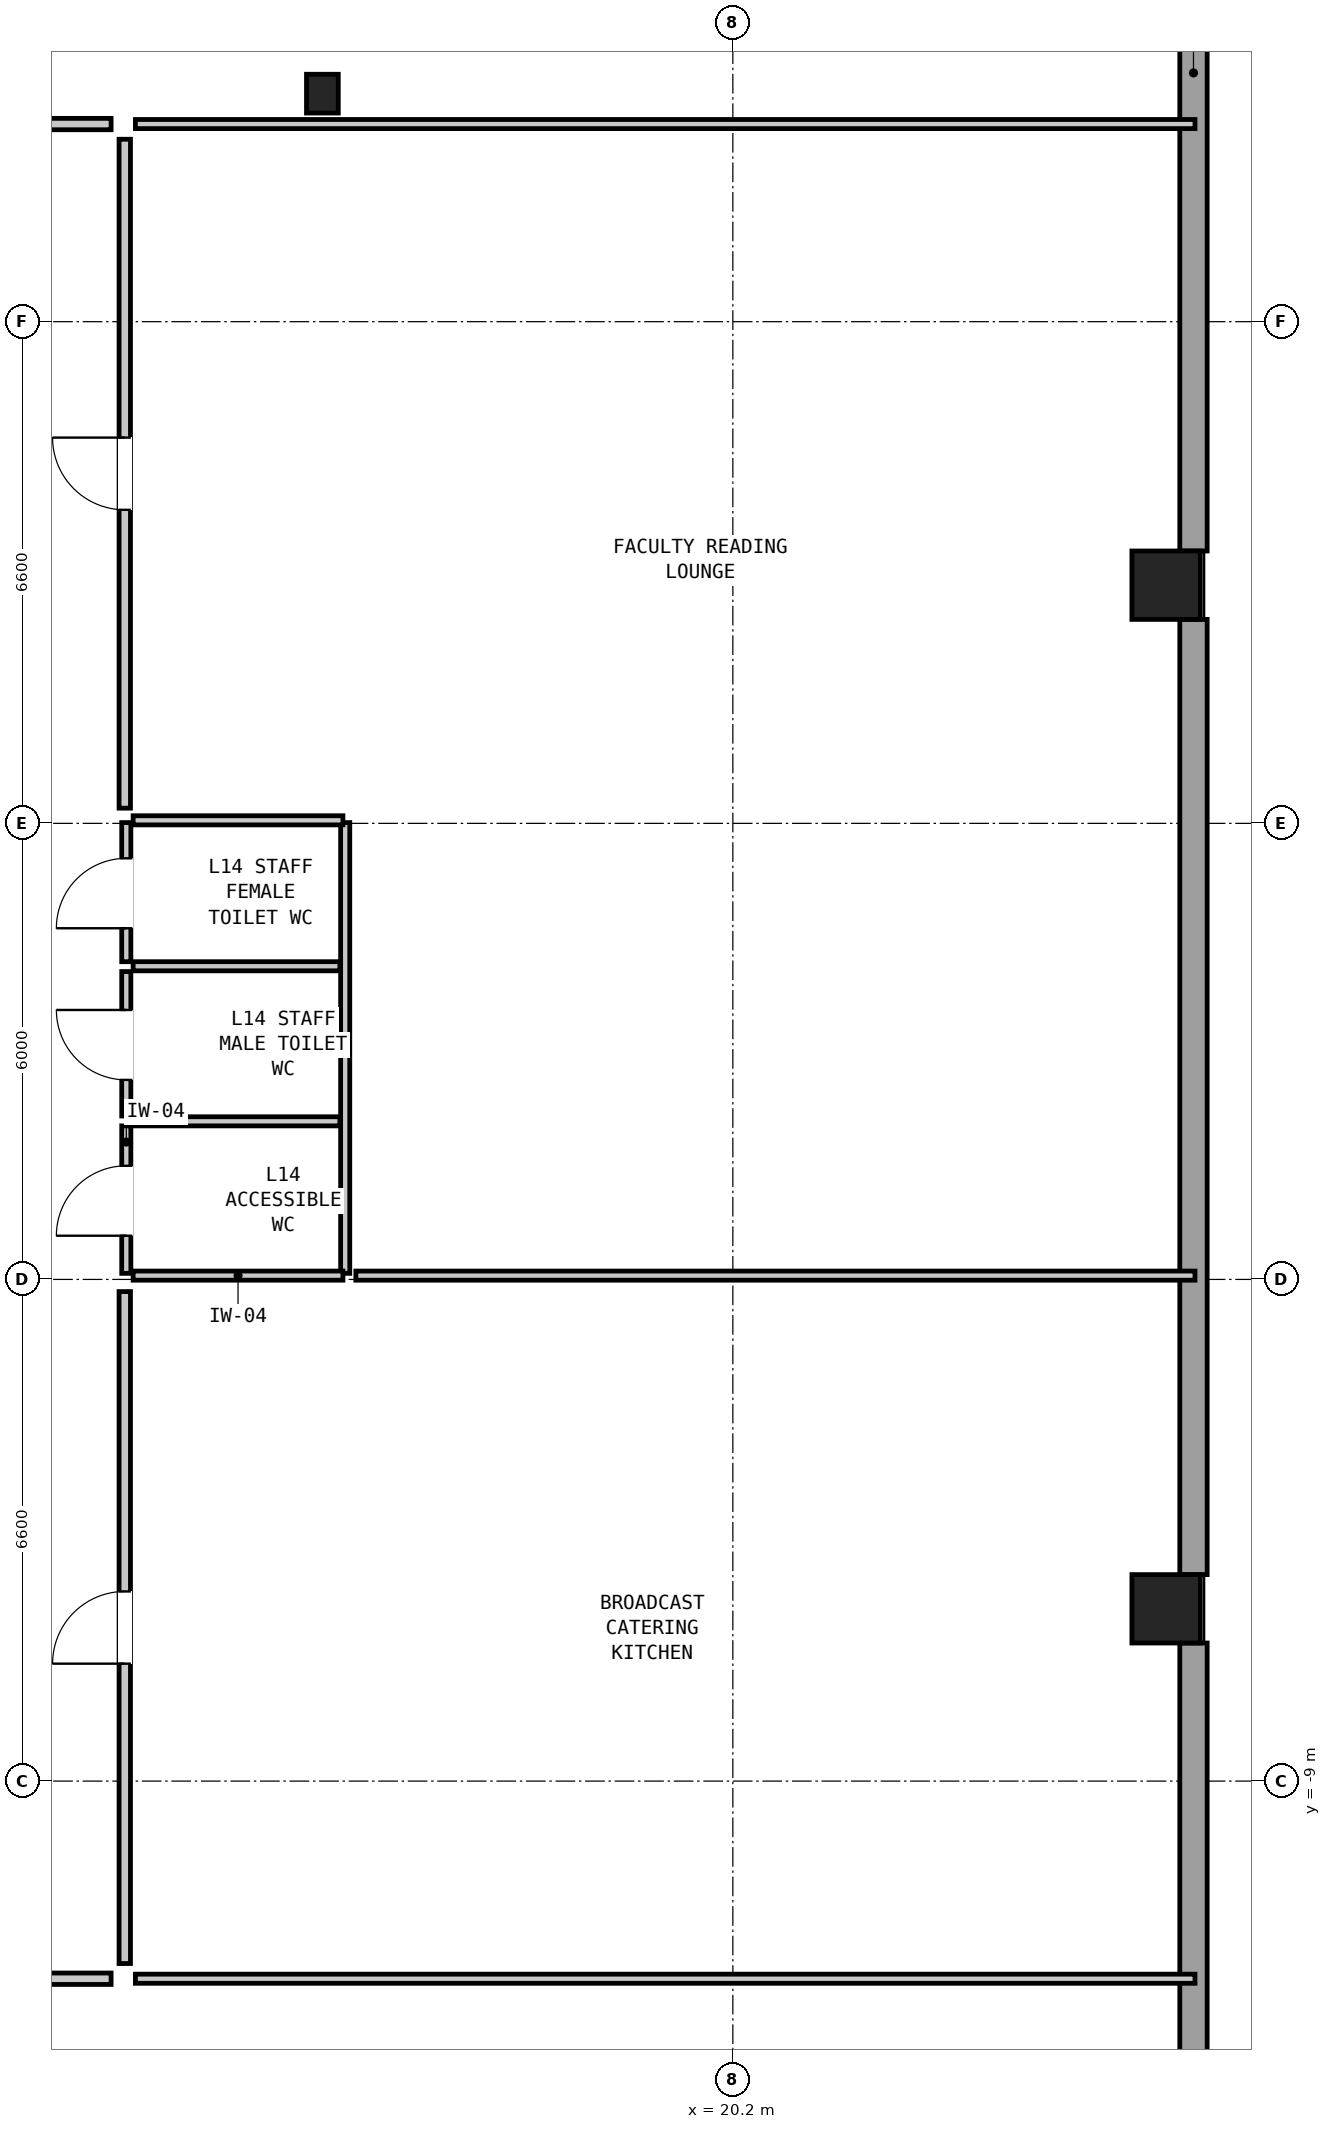
"""IFC4 building model, lengths in metres.
Left out: names, types, materials, properties, quantities, classifications, styles, units other than length and angle.
Written with IfcOpenShell. Run it as: python <this file> out.ifc"""

import sys

from ifc_helpers import new_model, si_unit, direction, frame, frame_2d, origin, origin_2d, place, context, subcontext, project, spatial, rectangle, hollow_rectangle, i_section, extrude, element, fill, save


model = new_model("IFC4")
c1 = context("Model", 3, precision=1e-05, world=origin(), true_north=direction((0.0, 1.0)))
c2 = subcontext(c1, "Body", "Model", "MODEL_VIEW")
j1 = project(units=[si_unit("LENGTHUNIT", "METRE"), si_unit("PLANEANGLEUNIT", "RADIAN")], contexts=[c1])
p1 = place(None, origin())
s1 = spatial("IfcSite", under=j1, at=p1, CompositionType="ELEMENT")
p2 = place(p1, origin())
s2 = spatial("IfcBuilding", under=s1, at=p2, CompositionType="ELEMENT")
p3 = place(p2, frame((0.0, 0.0, 50.5)))
s3 = spatial("IfcBuildingStorey", under=s2, at=p3, CompositionType="ELEMENT", Elevation=50.5)
for number, where, z_axis, x_axis in (
    (1, (25.9, -6.733, 0.0), (0.0, 0.0, 1.0), (0.0, 1.0, 0.0)),
    (2, (25.9, 6.733, 0.0), (0.0, 0.0, 1.0), (0.0, 1.0, 0.0)),
):
    element("IfcColumn", number, at=place(p3, frame(where, z_axis=z_axis, x_axis=x_axis)), inside=s3, PredefinedType="COLUMN", context=c2, shape_type="SweptSolid", body=[
        extrude(hollow_rectangle(XDim=0.9, YDim=0.9, WallThickness=0.055, at=origin_2d()), origin(), (0.0, 0.0, 1.0), 3.05),
    ])
p4 = place(p3, frame((14.8, 13.2, 0.0), z_axis=(0.0, 0.0, 1.0), x_axis=(1.0, 0.0, 0.0)))
e3 = element("IfcColumn", 3, at=p4, inside=s3, PredefinedType="COLUMN", context=c2, shape_type="SweptSolid", body=[
    extrude(i_section(OverallWidth=0.418, OverallDepth=0.51, WebThickness=0.042, FlangeThickness=0.068, at=origin_2d()), origin(), (0.0, 0.0, 1.0), 3.05),
])
p5 = place(p3, frame((26.26, 19.762, 0.0), z_axis=(0.0, 0.0, 1.0), x_axis=(0.0, -1.0, 0.0)))
e4 = element("IfcWall", 4, at=p5, inside=s3, PredefinedType="SOLIDWALL", context=c2, shape_type="SweptSolid", body=[
    extrude(rectangle(XDim=12.579, YDim=0.36, at=frame_2d((6.289, 0.0))), origin(), (0.0, 0.0, 1.0), 0.95),
])
p6 = place(p3, frame((26.26, 6.283, 0.0), z_axis=(0.0, 0.0, 1.0), x_axis=(0.0, -1.0, 0.0)))
e5 = element("IfcWall", 5, at=p6, inside=s3, PredefinedType="SOLIDWALL", context=c2, shape_type="SweptSolid", body=[
    extrude(rectangle(XDim=12.566, YDim=0.36, at=frame_2d((6.283, 0.0))), origin(), (0.0, 0.0, 1.0), 0.95),
])
p7 = place(p3, frame((26.26, -7.183, 0.0), z_axis=(0.0, 0.0, 1.0), x_axis=(0.0, -1.0, 0.0)))
e6 = element("IfcWall", 6, at=p7, inside=s3, PredefinedType="SOLIDWALL", context=c2, shape_type="SweptSolid", body=[
    extrude(rectangle(XDim=12.579, YDim=0.36, at=frame_2d((6.289, 0.0))), origin(), (0.0, 0.0, 1.0), 0.95),
])
p8 = place(p3, frame((12.22, -2.32, 0.0), z_axis=(0.0, 0.0, 1.0), x_axis=(0.0, 1.0, 0.0)))
e7 = element("IfcWall", 7, at=p8, inside=s3, PredefinedType="PARTITIONING", context=c2, shape_type="SweptSolid", body=[
    extrude(rectangle(XDim=1.94, YDim=0.12, at=frame_2d((0.97, 0.0))), origin(), (0.0, 0.0, 1.0), 2.83),
])
p9 = place(p8, frame((0.495, 0.0, 0.0)))
e8 = element("IfcOpeningElement", 8, at=p9, cuts=e7, PredefinedType="OPENING", context=c2, shape_type="SweptSolid", body=[
    extrude(rectangle(XDim=0.92, YDim=2.1, at=frame_2d((0.46, 1.05))), frame((0.0, 0.072, 0.0), z_axis=(0.0, -1.0, 0.0), x_axis=(1.0, 0.0, 0.0)), (0.0, 0.0, 1.0), 0.144),
])
p10 = place(p3, frame((12.22, -0.25, 0.0), z_axis=(0.0, 0.0, 1.0), x_axis=(0.0, 1.0, 0.0)))
e9 = element("IfcWall", 9, at=p10, inside=s3, PredefinedType="PARTITIONING", context=c2, shape_type="SweptSolid", body=[
    extrude(rectangle(XDim=1.9, YDim=0.12, at=frame_2d((0.95, 0.0))), origin(), (0.0, 0.0, 1.0), 2.83),
])
p11 = place(p10, frame((0.475, 0.0, 0.0)))
e10 = element("IfcOpeningElement", 10, at=p11, cuts=e9, PredefinedType="OPENING", context=c2, shape_type="SweptSolid", body=[
    extrude(rectangle(XDim=0.92, YDim=2.1, at=frame_2d((0.46, 1.05))), frame((0.0, 0.072, 0.0), z_axis=(0.0, -1.0, 0.0), x_axis=(1.0, 0.0, 0.0)), (0.0, 0.0, 1.0), 0.144),
])
p12 = place(p3, frame((12.22, 1.78, 0.0), z_axis=(0.0, 0.0, 1.0), x_axis=(0.0, 1.0, 0.0)))
e11 = element("IfcWall", 11, at=p12, inside=s3, PredefinedType="PARTITIONING", context=c2, shape_type="SweptSolid", body=[
    extrude(rectangle(XDim=1.83, YDim=0.12, at=frame_2d((0.915, 0.0))), origin(), (0.0, 0.0, 1.0), 2.83),
])
p13 = place(p12, frame((0.44, 0.0, 0.0)))
e12 = element("IfcOpeningElement", 12, at=p13, cuts=e11, PredefinedType="OPENING", context=c2, shape_type="SweptSolid", body=[
    extrude(rectangle(XDim=0.92, YDim=2.1, at=frame_2d((0.46, 1.05))), frame((0.0, 0.072, 0.0), z_axis=(0.0, -1.0, 0.0), x_axis=(1.0, 0.0, 0.0)), (0.0, 0.0, 1.0), 0.144),
])
p14 = place(p3, frame((15.1, -2.32, 0.0), z_axis=(0.0, 0.0, 1.0), x_axis=(0.0, 1.0, 0.0)))
e13 = element("IfcWall", 13, at=p14, inside=s3, PredefinedType="PARTITIONING", context=c2, shape_type="SweptSolid", body=[
    extrude(rectangle(XDim=5.93, YDim=0.12, at=frame_2d((2.965, 0.0))), origin(), (0.0, 0.0, 1.0), 2.83),
])
for number, where, z_axis, x_axis in (
    (14, (12.31, -2.35, 0.0), (0.0, 0.0, 1.0), (1.0, 0.0, 0.0)),
    (15, (12.31, 3.64, 0.0), (0.0, 0.0, 1.0), (1.0, 0.0, 0.0)),
):
    element("IfcWall", number, at=place(p3, frame(where, z_axis=z_axis, x_axis=x_axis)), inside=s3, PredefinedType="PARTITIONING", context=c2, shape_type="SweptSolid", body=[
        extrude(rectangle(XDim=2.76, YDim=0.12, at=frame_2d((1.38, 0.0))), origin(), (0.0, 0.0, 1.0), 1.01),
    ])
for number, where, z_axis, x_axis in (
    (16, (12.31, -0.32, 0.0), (0.0, 0.0, 1.0), (1.0, 0.0, 0.0)),
    (17, (12.31, 1.72, 0.0), (0.0, 0.0, 1.0), (1.0, 0.0, 0.0)),
):
    element("IfcWall", number, at=place(p3, frame(where, z_axis=z_axis, x_axis=x_axis)), inside=s3, PredefinedType="PARTITIONING", context=c2, shape_type="SweptSolid", body=[
        extrude(rectangle(XDim=2.72, YDim=0.12, at=frame_2d((1.36, 0.0))), origin(), (0.0, 0.0, 1.0), 2.83),
    ])
p15 = place(p3, frame((12.34, 12.8, 0.0), z_axis=(0.0, 0.0, 1.0), x_axis=(1.0, 0.0, 0.0)))
e18 = element("IfcWall", 18, at=p15, inside=s3, PredefinedType="PARTITIONING", context=c2, shape_type="SweptSolid", body=[
    extrude(rectangle(XDim=13.94, YDim=0.12, at=frame_2d((6.97, 0.0))), origin(), (0.0, 0.0, 1.0), 2.83),
])
p16 = place(p3, frame((12.34, -11.6, 0.0), z_axis=(0.0, 0.0, 1.0), x_axis=(1.0, 0.0, 0.0)))
e19 = element("IfcWall", 19, at=p16, inside=s3, PredefinedType="PARTITIONING", context=c2, shape_type="SweptSolid", body=[
    extrude(rectangle(XDim=13.94, YDim=0.12, at=frame_2d((6.97, 0.0))), origin(), (0.0, 0.0, 1.0), 2.274),
])
p17 = place(p3, frame((15.24, -2.35, 0.0), z_axis=(0.0, 0.0, 1.0), x_axis=(1.0, 0.0, 0.0)))
e20 = element("IfcWall", 20, at=p17, inside=s3, PredefinedType="PARTITIONING", context=c2, shape_type="SweptSolid", body=[
    extrude(rectangle(XDim=11.04, YDim=0.12, at=frame_2d((5.52, 0.0))), origin(), (0.0, 0.0, 1.0), 1.01),
])
p18 = place(p3, frame((5.58, 12.8, 0.0), z_axis=(0.0, 0.0, 1.0), x_axis=(1.0, 0.0, 0.0)))
e21 = element("IfcWall", 21, at=p18, inside=s3, PredefinedType="PARTITIONING", context=c2, shape_type="SweptSolid", body=[
    extrude(rectangle(XDim=6.44, YDim=0.15, at=frame_2d((3.22, 0.0))), origin(), (0.0, 0.0, 1.0), 2.83),
])
p19 = place(p18, frame((2.22, 0.0, 0.0)))
e22 = element("IfcOpeningElement", 22, at=p19, cuts=e21, PredefinedType="OPENING", context=c2, shape_type="SweptSolid", body=[
    extrude(rectangle(XDim=1.2, YDim=2.1, at=frame_2d((0.6, 1.05))), frame((0.0, 0.087, 0.0), z_axis=(0.0, -1.0, 0.0), x_axis=(1.0, 0.0, 0.0)), (0.0, 0.0, 1.0), 0.174),
])
p20 = place(p3, frame((0.18, -11.6, 0.0), z_axis=(0.0, 0.0, 1.0), x_axis=(1.0, 0.0, 0.0)))
e23 = element("IfcWall", 23, at=p20, inside=s3, PredefinedType="PARTITIONING", context=c2, shape_type="SweptSolid", body=[
    extrude(rectangle(XDim=11.84, YDim=0.15, at=frame_2d((5.92, 0.0))), origin(), (0.0, 0.0, 1.0), 2.274),
])
p21 = place(p20, frame((5.32, 0.0, 0.0)))
e24 = element("IfcOpeningElement", 24, at=p21, cuts=e23, PredefinedType="OPENING", context=c2, shape_type="SweptSolid", body=[
    extrude(rectangle(XDim=1.2, YDim=2.1, at=frame_2d((0.6, 1.05))), frame((0.0, 0.087, 0.0), z_axis=(0.0, -1.0, 0.0), x_axis=(1.0, 0.0, 0.0)), (0.0, 0.0, 1.0), 0.174),
])
p22 = place(p3, frame((12.2, -11.4, 0.0), z_axis=(0.0, 0.0, 1.0), x_axis=(0.0, 1.0, 0.0)))
e25 = element("IfcWall", 25, at=p22, inside=s3, PredefinedType="PARTITIONING", context=c2, shape_type="SweptSolid", body=[
    extrude(rectangle(XDim=8.84, YDim=0.15, at=frame_2d((4.42, 0.0))), origin(), (0.0, 0.0, 1.0), 2.83),
])
p23 = place(p22, frame((3.945, 0.0, 0.0)))
e26 = element("IfcOpeningElement", 26, at=p23, cuts=e25, PredefinedType="OPENING", context=c2, shape_type="SweptSolid", body=[
    extrude(rectangle(XDim=0.95, YDim=2.1, at=frame_2d((0.475, 1.05))), frame((0.0, 0.087, 0.0), z_axis=(0.0, -1.0, 0.0), x_axis=(1.0, 0.0, 0.0)), (0.0, 0.0, 1.0), 0.174),
])
p24 = place(p3, frame((12.2, 3.8, 0.0), z_axis=(0.0, 0.0, 1.0), x_axis=(0.0, 1.0, 0.0)))
e27 = element("IfcWall", 27, at=p24, inside=s3, PredefinedType="PARTITIONING", context=c2, shape_type="SweptSolid", body=[
    extrude(rectangle(XDim=8.8, YDim=0.15, at=frame_2d((4.4, 0.0))), origin(), (0.0, 0.0, 1.0), 2.83),
])
p25 = place(p24, frame((3.925, 0.0, 0.0)))
e28 = element("IfcOpeningElement", 28, at=p25, cuts=e27, PredefinedType="OPENING", context=c2, shape_type="SweptSolid", body=[
    extrude(rectangle(XDim=0.95, YDim=2.1, at=frame_2d((0.475, 1.05))), frame((0.0, 0.087, 0.0), z_axis=(0.0, -1.0, 0.0), x_axis=(1.0, 0.0, 0.0)), (0.0, 0.0, 1.0), 0.174),
])
p26 = place(p9, origin())
e29 = element("IfcDoor", 29, at=p26, inside=s3, OperationType="SINGLE_SWING_LEFT", PredefinedType="DOOR", context=c2, shape_type="SweptSolid", body=[
    extrude(rectangle(XDim=0.92, YDim=2.1, at=frame_2d((0.46, 1.05))), frame((0.0, 0.025, 0.0), z_axis=(0.0, -1.0, 0.0), x_axis=(1.0, 0.0, 0.0)), (0.0, 0.0, 1.0), 0.05),
])
fill(e8, e29)
p27 = place(p11, origin())
e30 = element("IfcDoor", 30, at=p27, inside=s3, OperationType="SINGLE_SWING_RIGHT", PredefinedType="DOOR", context=c2, shape_type="SweptSolid", body=[
    extrude(rectangle(XDim=0.92, YDim=2.1, at=frame_2d((0.46, 1.05))), frame((0.0, 0.025, 0.0), z_axis=(0.0, -1.0, 0.0), x_axis=(1.0, 0.0, 0.0)), (0.0, 0.0, 1.0), 0.05),
])
fill(e10, e30)
p28 = place(p13, origin())
e31 = element("IfcDoor", 31, at=p28, inside=s3, OperationType="SINGLE_SWING_LEFT", PredefinedType="DOOR", context=c2, shape_type="SweptSolid", body=[
    extrude(rectangle(XDim=0.92, YDim=2.1, at=frame_2d((0.46, 1.05))), frame((0.0, 0.025, 0.0), z_axis=(0.0, -1.0, 0.0), x_axis=(1.0, 0.0, 0.0)), (0.0, 0.0, 1.0), 0.05),
])
fill(e12, e31)
p29 = place(p23, origin())
e32 = element("IfcDoor", 32, at=p29, inside=s3, OperationType="SINGLE_SWING_LEFT", PredefinedType="DOOR", context=c2, shape_type="SweptSolid", body=[
    extrude(rectangle(XDim=0.95, YDim=2.1, at=frame_2d((0.475, 1.05))), frame((0.0, 0.025, 0.0), z_axis=(0.0, -1.0, 0.0), x_axis=(1.0, 0.0, 0.0)), (0.0, 0.0, 1.0), 0.05),
])
fill(e26, e32)
p30 = place(p25, origin())
e33 = element("IfcDoor", 33, at=p30, inside=s3, OperationType="SINGLE_SWING_RIGHT", PredefinedType="DOOR", context=c2, shape_type="SweptSolid", body=[
    extrude(rectangle(XDim=0.95, YDim=2.1, at=frame_2d((0.475, 1.05))), frame((0.0, 0.025, 0.0), z_axis=(0.0, -1.0, 0.0), x_axis=(1.0, 0.0, 0.0)), (0.0, 0.0, 1.0), 0.05),
])
fill(e28, e33)
save(model, sys.argv[1])
